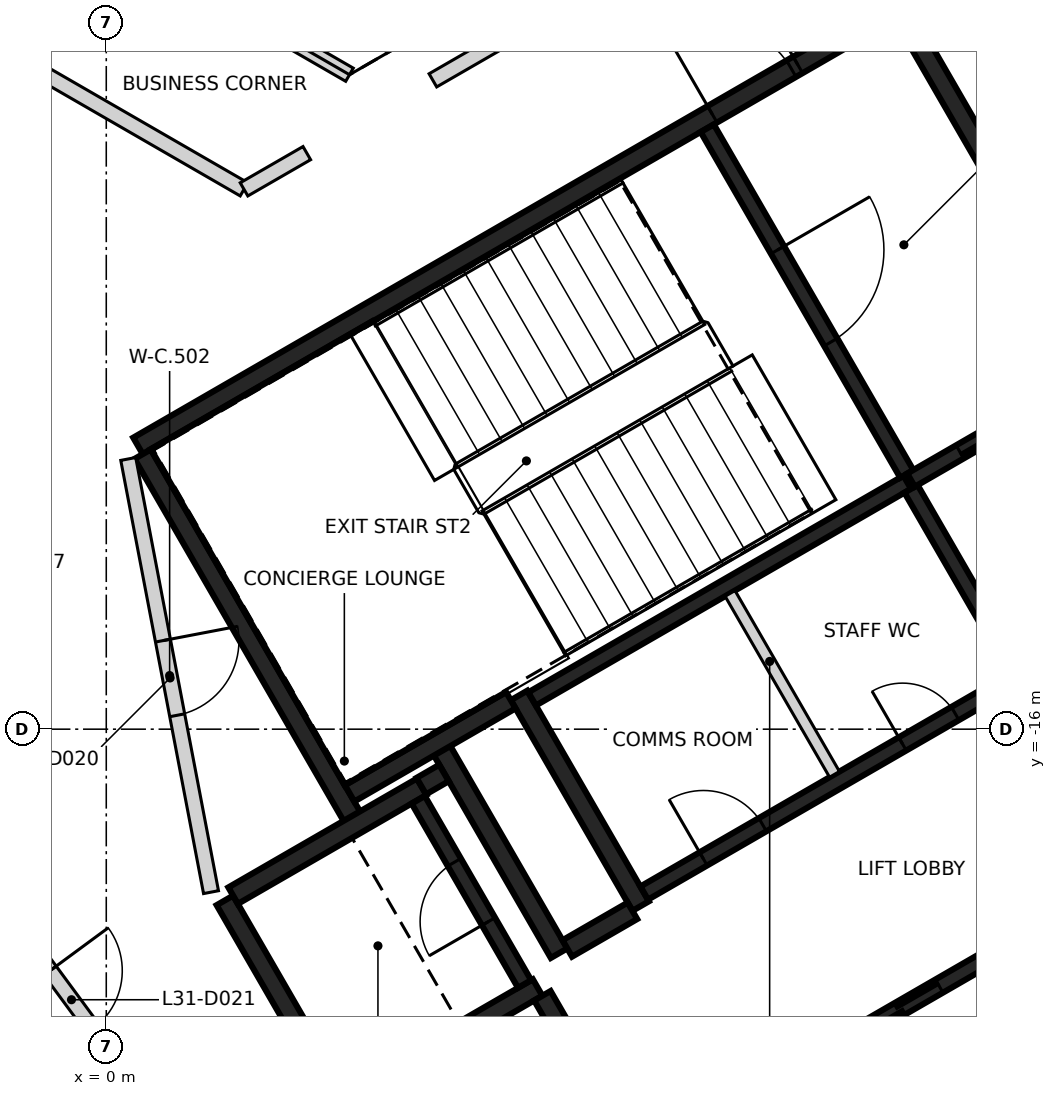
"""IFC4 building model, lengths in metres.
Left out: names, types, materials, properties, quantities, classifications, styles, units other than length and angle.
Written with IfcOpenShell. Run it as: python <this file> out.ifc"""

import sys

from ifc_helpers import new_model, si_unit, direction, frame, frame_2d, origin, place, context, subcontext, project, spatial, rectangle, extrude, element, fill, save


model = new_model("IFC4")
c1 = context("Model", 3, precision=1e-05, world=origin(), true_north=direction((0.0, 1.0)))
c2 = subcontext(c1, "Body", "Model", "MODEL_VIEW")
j1 = project(units=[si_unit("LENGTHUNIT", "METRE"), si_unit("PLANEANGLEUNIT", "RADIAN")], contexts=[c1])
p1 = place(None, origin())
s1 = spatial("IfcSite", under=j1, at=p1, CompositionType="ELEMENT")
p2 = place(p1, origin())
s2 = spatial("IfcBuilding", under=s1, at=p2, CompositionType="ELEMENT")
p3 = place(p2, frame((0.0, 0.0, 128.8)))
s3 = spatial("IfcBuildingStorey", under=s2, at=p3, CompositionType="ELEMENT", Elevation=128.8)
p4 = place(p3, frame((0.417, -12.273, 0.0), z_axis=(0.0, 0.0, 1.0), x_axis=(0.866021906294, 0.500006057782, 0.0)))
e1 = element("IfcWall", 1, at=p4, inside=s3, PredefinedType="SHEAR", context=c2, shape_type="SweptSolid", body=[
    extrude(rectangle(XDim=11.55, YDim=0.25, at=frame_2d((5.775, 0.0))), origin(), (0.0, 0.0, 1.0), 3.2),
])
p5 = place(p4, frame((10.025, 0.0, 0.0)))
e2 = element("IfcOpeningElement", 2, at=p5, cuts=e1, PredefinedType="OPENING", context=c2, shape_type="SweptSolid", body=[
    extrude(rectangle(XDim=1.2, YDim=2.1, at=frame_2d((0.6, 1.05))), frame((0.0, 0.135, 0.0), z_axis=(0.0, -1.0, 0.0), x_axis=(1.0, 0.0, 0.0)), (0.0, 0.0, 1.0), 0.27),
])
p6 = place(p4, frame((8.725, 0.0, 0.0)))
e3 = element("IfcOpeningElement", 3, at=p6, cuts=e1, PredefinedType="OPENING", context=c2, shape_type="SweptSolid", body=[
    extrude(rectangle(XDim=1.2, YDim=2.1, at=frame_2d((0.6, 1.05))), frame((0.0, 0.135, 0.0), z_axis=(0.0, -1.0, 0.0), x_axis=(1.0, 0.0, 0.0)), (0.0, 0.0, 1.0), 0.27),
])
p7 = place(p3, frame((3.235, -17.153, 0.0), z_axis=(0.0, 0.0, 1.0), x_axis=(-0.500008851346, 0.866020293397, 0.0)))
e4 = element("IfcWall", 4, at=p7, inside=s3, PredefinedType="SHEAR", context=c2, shape_type="SweptSolid", body=[
    extrude(rectangle(XDim=5.51, YDim=0.25, at=frame_2d((2.755, 0.0))), origin(), (0.0, 0.0, 1.0), 3.2),
])
p8 = place(p3, frame((10.483, -6.606, 0.0), z_axis=(0.0, 0.0, 1.0), x_axis=(0.49999885962, -0.866026062182, 0.0)))
e5 = element("IfcWall", 5, at=p8, inside=s3, PredefinedType="SHEAR", context=c2, shape_type="SweptSolid", body=[
    extrude(rectangle(XDim=5.225, YDim=0.25, at=frame_2d((2.612, 0.0))), origin(), (0.0, 0.0, 1.0), 3.2),
])
p9 = place(p3, frame((7.031, -18.327, 0.0), z_axis=(0.0, 0.0, 1.0), x_axis=(-0.499971222258, 0.866042017984, 0.0)))
e6 = element("IfcWall", 6, at=p9, inside=s3, PredefinedType="SHEAR", context=c2, shape_type="SweptSolid", body=[
    extrude(rectangle(XDim=3.2, YDim=0.25, at=frame_2d((1.6, 0.0))), origin(), (0.0, 0.0, 1.0), 3.2),
])
p10 = place(p3, frame((3.085, -20.894, 0.0), z_axis=(0.0, 0.0, 1.0), x_axis=(-0.499978833458, 0.866037623948, 0.0)))
e7 = element("IfcWall", 7, at=p10, inside=s3, PredefinedType="SHEAR", context=c2, shape_type="SweptSolid", body=[
    extrude(rectangle(XDim=3.05, YDim=0.25, at=frame_2d((1.525, 0.0))), origin(), (0.0, 0.0, 1.0), 3.2),
])
p11 = place(p3, frame((1.669, -18.19, 0.0), z_axis=(0.0, 0.0, 1.0), x_axis=(0.866042235819, 0.499970844928, 0.0)))
e8 = element("IfcWall", 8, at=p11, inside=s3, PredefinedType="SHEAR", context=c2, shape_type="SweptSolid", body=[
    extrude(rectangle(XDim=2.865, YDim=0.25, at=frame_2d((1.432, 0.0))), origin(), (0.0, 0.0, 1.0), 3.2),
])
p12 = place(p3, frame((5.675, -19.399, 0.0), z_axis=(0.0, 0.0, 1.0), x_axis=(-0.866026637627, -0.499997862916, 0.0)))
e9 = element("IfcWall", 9, at=p12, inside=s3, PredefinedType="SHEAR", context=c2, shape_type="SweptSolid", body=[
    extrude(rectangle(XDim=2.865, YDim=0.25, at=frame_2d((1.432, 0.0))), origin(), (0.0, 0.0, 1.0), 3.2),
])
p13 = place(p3, frame((4.414, -16.276, 0.0), z_axis=(0.0, 0.0, 1.0), x_axis=(0.500003324108, -0.866023484601, 0.0)))
e10 = element("IfcWall", 10, at=p13, inside=s3, PredefinedType="SHEAR", context=c2, shape_type="SweptSolid", body=[
    extrude(rectangle(XDim=3.085, YDim=0.25, at=frame_2d((1.542, 0.0))), origin(), (0.0, 0.0, 1.0), 3.2),
])
p14 = place(p3, frame((5.322, -15.619, 0.0), z_axis=(0.0, 0.0, 1.0), x_axis=(-0.866026229868, -0.499998569178, 0.0)))
e11 = element("IfcWall", 11, at=p14, inside=s3, PredefinedType="SHEAR", context=c2, shape_type="SweptSolid", body=[
    extrude(rectangle(XDim=2.449, YDim=0.25, at=frame_2d((1.225, 0.0))), origin(), (0.0, 0.0, 1.0), 3.2),
])
p15 = place(p3, frame((6.065, -18.885, 0.0), z_axis=(0.0, 0.0, 1.0), x_axis=(0.866017078145, 0.500014420154, 0.0)))
e12 = element("IfcWall", 12, at=p15, inside=s3, PredefinedType="SHEAR", context=c2, shape_type="SweptSolid", body=[
    extrude(rectangle(XDim=0.989, YDim=0.25, at=frame_2d((0.495, 0.0))), origin(), (0.0, 0.0, 1.0), 3.2),
])
p16 = place(p3, frame((6.08, -20.1, 0.0), z_axis=(0.0, 0.0, 1.0), x_axis=(-0.500051773299, 0.865995510393, 0.0)))
e13 = element("IfcWall", 13, at=p16, inside=s3, PredefinedType="SHEAR", context=c2, shape_type="SweptSolid", body=[
    extrude(rectangle(XDim=0.685, YDim=0.25, at=frame_2d((0.342, 0.0))), origin(), (0.0, 0.0, 1.0), 3.2),
])
p17 = place(p3, frame((4.145, -16.749, 0.0), z_axis=(0.0, 0.0, 1.0), x_axis=(0.866185586049, 0.49972245349, 0.0)))
e14 = element("IfcWall", 14, at=p17, inside=s3, PredefinedType="SHEAR", context=c2, shape_type="SweptSolid", body=[
    extrude(rectangle(XDim=0.344, YDim=0.25, at=frame_2d((0.172, 0.0))), origin(), (0.0, 0.0, 1.0), 3.2),
])
p18 = place(p3, frame((9.052, -20.48, 0.0), z_axis=(0.0, 0.0, 1.0), x_axis=(0.866030299012, 0.499991521122, 0.0)))
e15 = element("IfcWall", 15, at=p18, inside=s3, PredefinedType="SHEAR", context=c2, shape_type="SweptSolid", body=[
    extrude(rectangle(XDim=6.1, YDim=0.2, at=frame_2d((3.05, 0.0))), origin(), (0.0, 0.0, 1.0), 3.2),
])
p19 = place(p18, frame((1.0, 0.0, 0.0)))
e16 = element("IfcOpeningElement", 16, at=p19, cuts=e15, PredefinedType="OPENING", context=c2, shape_type="SweptSolid", body=[
    extrude(rectangle(XDim=1.2, YDim=2.1, at=frame_2d((0.6, 1.05))), frame((0.0, 0.11, 0.0), z_axis=(0.0, -1.0, 0.0), x_axis=(1.0, 0.0, 0.0)), (0.0, 0.0, 1.0), 0.22),
])
p20 = place(p18, frame((4.05, 0.0, 0.0)))
e17 = element("IfcOpeningElement", 17, at=p20, cuts=e15, PredefinedType="OPENING", context=c2, shape_type="SweptSolid", body=[
    extrude(rectangle(XDim=1.2, YDim=2.1, at=frame_2d((0.6, 1.05))), frame((0.0, 0.11, 0.0), z_axis=(0.0, -1.0, 0.0), x_axis=(1.0, 0.0, 0.0)), (0.0, 0.0, 1.0), 0.22),
])
p21 = place(p3, frame((10.538, -12.752, 0.0), z_axis=(0.0, 0.0, 1.0), x_axis=(-0.866038630372, -0.499977090179, 0.0)))
e18 = element("IfcWall", 18, at=p21, inside=s3, PredefinedType="SHEAR", context=c2, shape_type="SweptSolid", body=[
    extrude(rectangle(XDim=5.699, YDim=0.2, at=frame_2d((2.85, 0.0))), origin(), (0.0, 0.0, 1.0), 3.2),
])
p22 = place(p3, frame((7.077, -18.156, 0.0), z_axis=(0.0, 0.0, 1.0), x_axis=(0.866038630372, 0.499977090179, 0.0)))
e19 = element("IfcWall", 19, at=p22, inside=s3, PredefinedType="SHEAR", context=c2, shape_type="SweptSolid", body=[
    extrude(rectangle(XDim=5.699, YDim=0.2, at=frame_2d((2.85, 0.0))), origin(), (0.0, 0.0, 1.0), 3.2),
])
p23 = place(p22, frame((0.899, 0.0, 0.0)))
e20 = element("IfcOpeningElement", 20, at=p23, cuts=e19, PredefinedType="OPENING", context=c2, shape_type="SweptSolid", body=[
    extrude(rectangle(XDim=0.9, YDim=2.1, at=frame_2d((0.45, 1.05))), frame((0.0, 0.11, 0.0), z_axis=(0.0, -1.0, 0.0), x_axis=(1.0, 0.0, 0.0)), (0.0, 0.0, 1.0), 0.22),
])
p24 = place(p22, frame((3.924, 0.0, 0.0)))
e21 = element("IfcOpeningElement", 21, at=p24, cuts=e19, PredefinedType="OPENING", context=c2, shape_type="SweptSolid", body=[
    extrude(rectangle(XDim=0.8, YDim=2.1, at=frame_2d((0.4, 1.05))), frame((0.0, 0.11, 0.0), z_axis=(0.0, -1.0, 0.0), x_axis=(1.0, 0.0, 0.0)), (0.0, 0.0, 1.0), 0.22),
])
p25 = place(p3, frame((7.906, -8.094, 0.0), z_axis=(0.0, 0.0, 1.0), x_axis=(0.500024287448, -0.866011380966, 0.0)))
e22 = element("IfcWall", 22, at=p25, inside=s3, PredefinedType="SHEAR", context=c2, shape_type="SweptSolid", body=[
    extrude(rectangle(XDim=5.251, YDim=0.2, at=frame_2d((2.625, 0.0))), origin(), (0.0, 0.0, 1.0), 3.2),
])
p26 = place(p25, frame((1.849, 0.0, 0.0)))
e23 = element("IfcOpeningElement", 23, at=p26, cuts=e22, PredefinedType="OPENING", context=c2, shape_type="SweptSolid", body=[
    extrude(rectangle(XDim=1.4, YDim=2.1, at=frame_2d((0.7, 1.05))), frame((0.0, 0.11, 0.0), z_axis=(0.0, -1.0, 0.0), x_axis=(1.0, 0.0, 0.0)), (0.0, 0.0, 1.0), 0.22),
])
p27 = place(p3, frame((5.503, -19.352, 0.0), z_axis=(0.0, 0.0, 1.0), x_axis=(-0.499986818241, 0.866033014143, 0.0)))
e24 = element("IfcWall", 24, at=p27, inside=s3, PredefinedType="SHEAR", context=c2, shape_type="SweptSolid", body=[
    extrude(rectangle(XDim=2.798, YDim=0.2, at=frame_2d((1.399, 0.0))), origin(), (0.0, 0.0, 1.0), 3.2),
])
p28 = place(p27, frame((0.949, 0.0, 0.0)))
e25 = element("IfcOpeningElement", 25, at=p28, cuts=e24, PredefinedType="OPENING", context=c2, shape_type="SweptSolid", body=[
    extrude(rectangle(XDim=0.9, YDim=2.1, at=frame_2d((0.45, 1.05))), frame((0.0, 0.11, 0.0), z_axis=(0.0, -1.0, 0.0), x_axis=(1.0, 0.0, 0.0)), (0.0, 0.0, 1.0), 0.22),
])
p29 = place(p3, frame((11.963, -15.22, 0.0), z_axis=(0.0, 0.0, 1.0), x_axis=(-0.500034990121, 0.866005201286, 0.0)))
e26 = element("IfcWall", 26, at=p29, inside=s3, PredefinedType="SHEAR", context=c2, shape_type="SweptSolid", body=[
    extrude(rectangle(XDim=2.75, YDim=0.2, at=frame_2d((1.375, 0.0))), origin(), (0.0, 0.0, 1.0), 3.2),
])
p30 = place(p3, frame((10.587, -12.723, 0.0), z_axis=(0.0, 0.0, 1.0), x_axis=(0.866037306777, 0.499979382845, 0.0)))
e27 = element("IfcWall", 27, at=p30, inside=s3, PredefinedType="SHEAR", context=c2, shape_type="SweptSolid", body=[
    extrude(rectangle(XDim=2.742, YDim=0.2, at=frame_2d((1.371, 0.0))), origin(), (0.0, 0.0, 1.0), 3.2),
])
p31 = place(p30, frame((0.743, 0.0, 0.0)))
e28 = element("IfcOpeningElement", 28, at=p31, cuts=e27, PredefinedType="OPENING", context=c2, shape_type="SweptSolid", body=[
    extrude(rectangle(XDim=1.3, YDim=2.1, at=frame_2d((0.65, 1.05))), frame((0.0, 0.11, 0.0), z_axis=(0.0, -1.0, 0.0), x_axis=(1.0, 0.0, 0.0)), (0.0, 0.0, 1.0), 0.22),
])
p32 = place(p3, frame((8.207, -14.214, 0.0), z_axis=(0.0, 0.0, 1.0), x_axis=(0.50002746344, -0.86600954718, 0.0)))
e29 = element("IfcWall", 29, at=p32, inside=s3, PredefinedType="PARTITIONING", context=c2, shape_type="SweptSolid", body=[
    extrude(rectangle(XDim=2.748, YDim=0.15, at=frame_2d((1.374, 0.0))), origin(), (0.0, 0.0, 1.0), 3.2),
])
p33 = place(p3, frame((-8.612, -2.88, 0.0), z_axis=(0.0, 0.0, 1.0), x_axis=(0.866035279512, -0.499982894348, 0.0)))
e30 = element("IfcWall", 30, at=p33, inside=s3, PredefinedType="PARTITIONING", context=c2, shape_type="SweptSolid", body=[
    extrude(rectangle(XDim=12.037, YDim=0.2, at=frame_2d((6.018, 0.0))), origin(), (0.0, 0.0, 1.0), 3.2),
])
p34 = place(p33, frame((1.484, 0.0, 0.0)))
e31 = element("IfcOpeningElement", 31, at=p34, cuts=e30, PredefinedType="OPENING", context=c2, shape_type="SweptSolid", body=[
    extrude(rectangle(XDim=0.9, YDim=2.1, at=frame_2d((0.45, 1.05))), frame((0.0, 0.11, 0.0), z_axis=(0.0, -1.0, 0.0), x_axis=(1.0, 0.0, 0.0)), (0.0, 0.0, 1.0), 0.22),
])
p35 = place(p33, frame((7.491, 0.0, 0.0)))
e32 = element("IfcOpeningElement", 32, at=p35, cuts=e30, PredefinedType="OPENING", context=c2, shape_type="SweptSolid", body=[
    extrude(rectangle(XDim=0.9, YDim=2.1, at=frame_2d((0.45, 1.05))), frame((0.0, 0.11, 0.0), z_axis=(0.0, -1.0, 0.0), x_axis=(1.0, 0.0, 0.0)), (0.0, 0.0, 1.0), 0.22),
])
p36 = place(p3, frame((-0.858, -19.016, 0.0), z_axis=(0.0, 0.0, 1.0), x_axis=(0.593123867414, -0.805111220829, 0.0)))
e33 = element("IfcWall", 33, at=p36, inside=s3, PredefinedType="PARTITIONING", context=c2, shape_type="SweptSolid", body=[
    extrude(rectangle(XDim=2.77, YDim=0.2, at=frame_2d((1.385, 0.0))), origin(), (0.0, 0.0, 1.0), 3.2),
])
p37 = place(p36, frame((0.2, 0.0, 0.0)))
e34 = element("IfcOpeningElement", 34, at=p37, cuts=e33, PredefinedType="OPENING", context=c2, shape_type="SweptSolid", body=[
    extrude(rectangle(XDim=0.95, YDim=2.1, at=frame_2d((0.475, 1.05))), frame((0.0, 0.11, 0.0), z_axis=(0.0, -1.0, 0.0), x_axis=(1.0, 0.0, 0.0)), (0.0, 0.0, 1.0), 0.22),
])
p38 = place(p3, frame((0.289, -12.445, 0.0), z_axis=(0.0, 0.0, 1.0), x_axis=(0.187668946952, -0.982232338273, 0.0)))
e35 = element("IfcWall", 35, at=p38, inside=s3, PredefinedType="PARTITIONING", context=c2, shape_type="SweptSolid", body=[
    extrude(rectangle(XDim=5.802, YDim=0.2, at=frame_2d((2.901, 0.0))), origin(), (0.0, 0.0, 1.0), 3.2),
])
p39 = place(p38, frame((2.433, 0.0, 0.0)))
e36 = element("IfcOpeningElement", 36, at=p39, cuts=e35, PredefinedType="OPENING", context=c2, shape_type="SweptSolid", body=[
    extrude(rectangle(XDim=1.0, YDim=2.1, at=frame_2d((0.5, 1.05))), frame((0.0, 0.11, 0.0), z_axis=(0.0, -1.0, 0.0), x_axis=(1.0, 0.0, 0.0)), (0.0, 0.0, 1.0), 0.22),
])
p40 = place(p3, frame((1.812, -8.898, 0.0), z_axis=(0.0, 0.0, 1.0), x_axis=(0.866108878364, 0.499855389907, 0.0)))
e37 = element("IfcWall", 37, at=p40, inside=s3, PredefinedType="PARTITIONING", context=c2, shape_type="SweptSolid", body=[
    extrude(rectangle(XDim=0.954, YDim=0.2, at=frame_2d((0.477, 0.0))), origin(), (0.0, 0.0, 1.0), 3.2),
])
p41 = place(p3, frame((4.297, -7.464, 0.0), z_axis=(0.0, 0.0, 1.0), x_axis=(0.86602521942, 0.500000319328, 0.0)))
e38 = element("IfcWall", 38, at=p41, inside=s3, PredefinedType="PARTITIONING", context=c2, shape_type="SweptSolid", body=[
    extrude(rectangle(XDim=2.89, YDim=0.2, at=frame_2d((1.445, 0.0))), origin(), (0.0, 0.0, 1.0), 2.3),
])
p42 = place(p3, frame((-8.0, -0.924, 0.0), z_axis=(0.0, 0.0, 1.0), x_axis=(0.86604129137, -0.499972480886, 0.0)))
e39 = element("IfcWall", 39, at=p42, inside=s3, PredefinedType="PARTITIONING", context=c2, shape_type="SweptSolid", body=[
    extrude(rectangle(XDim=12.932, YDim=0.2, at=frame_2d((6.466, 0.0))), origin(), (0.0, 0.0, 1.0), 2.3),
])
p43 = place(p31, origin())
e40 = element("IfcDoor", 40, at=p43, inside=s3, OperationType="SLIDING_TO_RIGHT", PredefinedType="DOOR", context=c2, shape_type="SweptSolid", body=[
    extrude(rectangle(XDim=1.3, YDim=2.1, at=frame_2d((0.65, 1.05))), frame((0.0, 0.025, 0.0), z_axis=(0.0, -1.0, 0.0), x_axis=(1.0, 0.0, 0.0)), (0.0, 0.0, 1.0), 0.05),
])
fill(e28, e40)
p44 = place(p19, origin())
e41 = element("IfcDoor", 41, at=p44, inside=s3, OperationType="DOUBLE_DOOR_SLIDING", PredefinedType="DOOR", context=c2, shape_type="SweptSolid", body=[
    extrude(rectangle(XDim=1.2, YDim=2.1, at=frame_2d((0.6, 1.05))), frame((0.0, 0.025, 0.0), z_axis=(0.0, -1.0, 0.0), x_axis=(1.0, 0.0, 0.0)), (0.0, 0.0, 1.0), 0.05),
])
fill(e16, e41)
p45 = place(p5, origin())
e42 = element("IfcDoor", 42, at=p45, inside=s3, OperationType="SINGLE_SWING_LEFT", PredefinedType="DOOR", context=c2, shape_type="SweptSolid", body=[
    extrude(rectangle(XDim=1.2, YDim=2.1, at=frame_2d((0.6, 1.05))), frame((0.0, 0.025, 0.0), z_axis=(0.0, -1.0, 0.0), x_axis=(1.0, 0.0, 0.0)), (0.0, 0.0, 1.0), 0.05),
])
fill(e2, e42)
p46 = place(p6, origin())
e43 = element("IfcDoor", 43, at=p46, inside=s3, OperationType="SINGLE_SWING_RIGHT", PredefinedType="DOOR", context=c2, shape_type="SweptSolid", body=[
    extrude(rectangle(XDim=1.2, YDim=2.1, at=frame_2d((0.6, 1.05))), frame((0.0, 0.025, 0.0), z_axis=(0.0, -1.0, 0.0), x_axis=(1.0, 0.0, 0.0)), (0.0, 0.0, 1.0), 0.05),
])
fill(e3, e43)
p47 = place(p26, origin())
e44 = element("IfcDoor", 44, at=p47, inside=s3, OperationType="SINGLE_SWING_RIGHT", PredefinedType="DOOR", context=c2, shape_type="SweptSolid", body=[
    extrude(rectangle(XDim=1.4, YDim=2.1, at=frame_2d((0.7, 1.05))), frame((0.0, 0.025, 0.0), z_axis=(0.0, -1.0, 0.0), x_axis=(1.0, 0.0, 0.0)), (0.0, 0.0, 1.0), 0.05),
])
fill(e23, e44)
p48 = place(p23, origin())
e45 = element("IfcDoor", 45, at=p48, inside=s3, OperationType="SINGLE_SWING_LEFT", PredefinedType="DOOR", context=c2, shape_type="SweptSolid", body=[
    extrude(rectangle(XDim=0.9, YDim=2.1, at=frame_2d((0.45, 1.05))), frame((0.0, 0.025, 0.0), z_axis=(0.0, -1.0, 0.0), x_axis=(1.0, 0.0, 0.0)), (0.0, 0.0, 1.0), 0.05),
])
fill(e20, e45)
p49 = place(p24, origin())
e46 = element("IfcDoor", 46, at=p49, inside=s3, OperationType="SINGLE_SWING_RIGHT", PredefinedType="DOOR", context=c2, shape_type="SweptSolid", body=[
    extrude(rectangle(XDim=0.8, YDim=2.1, at=frame_2d((0.4, 1.05))), frame((0.0, 0.025, 0.0), z_axis=(0.0, -1.0, 0.0), x_axis=(1.0, 0.0, 0.0)), (0.0, 0.0, 1.0), 0.05),
])
fill(e21, e46)
p50 = place(p28, origin())
e47 = element("IfcDoor", 47, at=p50, inside=s3, OperationType="SINGLE_SWING_LEFT", PredefinedType="DOOR", context=c2, shape_type="SweptSolid", body=[
    extrude(rectangle(XDim=0.9, YDim=2.1, at=frame_2d((0.45, 1.05))), frame((0.0, 0.025, 0.0), z_axis=(0.0, -1.0, 0.0), x_axis=(1.0, 0.0, 0.0)), (0.0, 0.0, 1.0), 0.05),
])
fill(e25, e47)
p51 = place(p39, origin())
e48 = element("IfcDoor", 48, at=p51, inside=s3, OperationType="SINGLE_SWING_LEFT", PredefinedType="DOOR", context=c2, shape_type="SweptSolid", body=[
    extrude(rectangle(XDim=1.0, YDim=2.1, at=frame_2d((0.5, 1.05))), frame((0.0, 0.025, 0.0), z_axis=(0.0, -1.0, 0.0), x_axis=(1.0, 0.0, 0.0)), (0.0, 0.0, 1.0), 0.05),
])
fill(e36, e48)
p52 = place(p37, frame((0.95, 0.0, 0.0), z_axis=(0.0, 0.0, 1.0), x_axis=(-1.0, 0.0, 0.0)))
e49 = element("IfcDoor", 49, at=p52, inside=s3, OperationType="SINGLE_SWING_LEFT", PredefinedType="DOOR", context=c2, shape_type="SweptSolid", body=[
    extrude(rectangle(XDim=0.95, YDim=2.1, at=frame_2d((0.475, 1.05))), frame((0.0, 0.025, 0.0), z_axis=(0.0, -1.0, 0.0), x_axis=(1.0, 0.0, 0.0)), (0.0, 0.0, 1.0), 0.05),
])
fill(e34, e49)
save(model, sys.argv[1])
